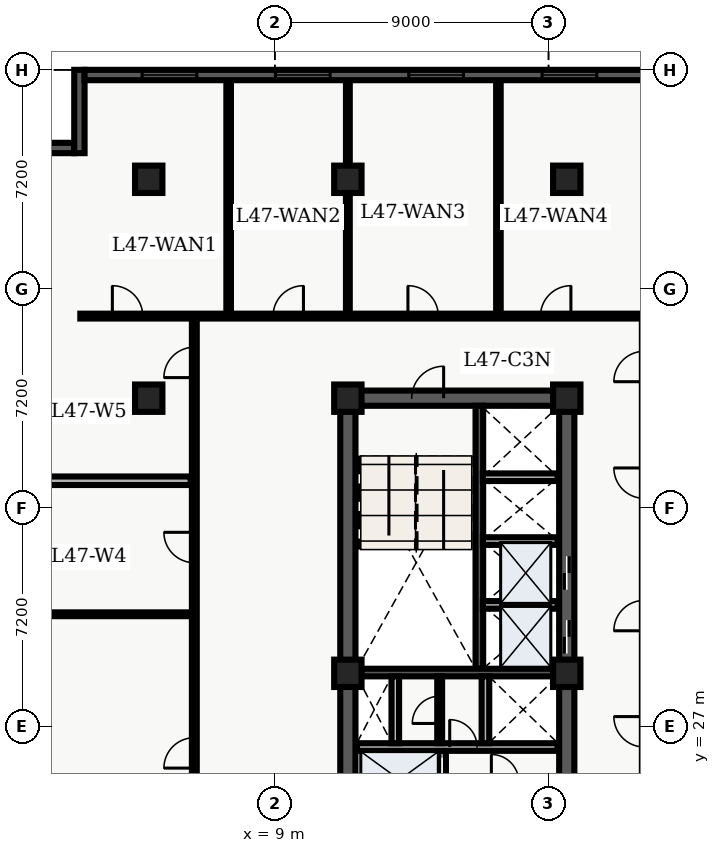
"""IFC4 building model, lengths in metres.
Left out: names, types, materials, properties, quantities, classifications, styles, units other than length and angle.
Written with IfcOpenShell. Run it as: python <this file> out.ifc"""

import sys

from ifc_helpers import new_model, entity, si_unit, converted_unit, direction, frame, origin_with_axes, origin_2d_with_axis, place, context, subcontext, project, spatial, polyline, rectangle, outline, extrude, element, fill, save


model = new_model("IFC4")
c1 = context("Model", 3, precision=1e-05, world=origin_with_axes(), true_north=direction((0.0, 1.0)))
c2 = subcontext(c1, "Body", "Model", "MODEL_VIEW")
j1 = project(units=[si_unit("LENGTHUNIT", "METRE"), converted_unit("PLANEANGLEUNIT", "DEGREE", entity("IfcPlaneAngleMeasure", 0.017), si_unit("PLANEANGLEUNIT", "RADIAN"), dimensions=[0, 0, 0, 0, 0, 0, 0])], contexts=[c1])
p1 = place(None, origin_with_axes())
s1 = spatial("IfcSite", under=j1, at=p1, CompositionType="ELEMENT")
p2 = place(p1, origin_with_axes())
s2 = spatial("IfcBuilding", under=s1, at=p2, CompositionType="ELEMENT")
p3 = place(p2, frame((0.0, 0.0, 192.6), z_axis=(0.0, 0.0, 1.0), x_axis=(1.0, 0.0, 0.0)))
s3 = spatial("IfcBuildingStorey", under=s2, at=p3, CompositionType="ELEMENT", Elevation=192.6)
p4 = place(p3, frame((11.4, 10.8, 0.0), z_axis=(0.0, 0.0, 1.0), x_axis=(0.0, 1.0, 0.0)))
e1 = element("IfcWall", 1, at=p4, inside=s3, PredefinedType="SHEAR", context=c2, shape_type="SweptSolid", body=[
    extrude(outline(polyline([(0.0, -0.25), (27.0, -0.25), (27.0, 0.25), (0.0, 0.25), (0.0, -0.25)])), origin_with_axes(), (0.0, 0.0, 1.0), 3.66),
])
p5 = place(p3, frame((11.4, 37.8, 0.0), z_axis=(0.0, 0.0, 1.0), x_axis=(1.0, 0.0, 0.0)))
e2 = element("IfcWall", 2, at=p5, inside=s3, PredefinedType="SHEAR", context=c2, shape_type="SweptSolid", body=[
    extrude(outline(polyline([(0.0, -0.25), (7.2, -0.25), (7.2, 0.25), (0.0, 0.25), (0.0, -0.25)])), origin_with_axes(), (0.0, 0.0, 1.0), 3.66),
])
p6 = place(p5, frame((2.625, 0.0, 0.0), z_axis=(0.0, 0.0, 1.0), x_axis=(1.0, 0.0, 0.0)))
e3 = element("IfcOpeningElement", 3, at=p6, cuts=e2, PredefinedType="OPENING", context=c2, shape_type="SweptSolid", body=[
    extrude(rectangle(XDim=1.05, YDim=0.52, at=origin_2d_with_axis()), origin_with_axes(), (0.0, 0.0, 1.0), 2.15),
])
p7 = place(p3, frame((18.6, 24.3, 0.0), z_axis=(0.0, 0.0, 1.0), x_axis=(0.0, 1.0, 0.0)))
e4 = element("IfcWall", 4, at=p7, inside=s3, PredefinedType="SHEAR", context=c2, shape_type="SweptSolid", body=[
    extrude(outline(polyline([(0.0, -0.25), (13.5, -0.25), (13.5, 0.25), (0.0, 0.25), (0.0, -0.25)])), origin_with_axes(), (0.0, 0.0, 1.0), 3.66),
])
p8 = place(p7, frame((5.65, 0.0, 0.0), z_axis=(0.0, 0.0, 1.0), x_axis=(1.0, 0.0, 0.0)))
e5 = element("IfcOpeningElement", 5, at=p8, cuts=e4, PredefinedType="OPENING", context=c2, shape_type="SweptSolid", body=[
    extrude(rectangle(XDim=1.1, YDim=0.52, at=origin_2d_with_axis()), origin_with_axes(), (0.0, 0.0, 1.0), 2.15),
])
p9 = place(p7, frame((7.75, 0.0, 0.0), z_axis=(0.0, 0.0, 1.0), x_axis=(1.0, 0.0, 0.0)))
e6 = element("IfcOpeningElement", 6, at=p9, cuts=e4, PredefinedType="OPENING", context=c2, shape_type="SweptSolid", body=[
    extrude(rectangle(XDim=1.1, YDim=0.52, at=origin_2d_with_axis()), origin_with_axes(), (0.0, 0.0, 1.0), 2.15),
])
p10 = place(p3, frame((15.725, 28.9, 0.0), z_axis=(0.0, 0.0, 1.0), x_axis=(0.0, 1.0, 0.0)))
e7 = element("IfcWall", 7, at=p10, inside=s3, PredefinedType="SHEAR", context=c2, shape_type="SweptSolid", body=[
    extrude(outline(polyline([(0.0, -0.125), (8.65, -0.125), (8.65, 0.125), (0.0, 0.125), (0.0, -0.125)])), origin_with_axes(), (0.0, 0.0, 1.0), 3.66),
])
p11 = place(p3, frame((11.65, 28.775, 0.0), z_axis=(0.0, 0.0, 1.0), x_axis=(1.0, 0.0, 0.0)))
e8 = element("IfcWall", 8, at=p11, inside=s3, PredefinedType="SHEAR", context=c2, shape_type="SweptSolid", body=[
    extrude(outline(polyline([(0.0, -0.125), (6.7, -0.125), (6.7, 0.125), (0.0, 0.125), (0.0, -0.125)])), origin_with_axes(), (0.0, 0.0, 1.0), 3.66),
])
p12 = place(p3, frame((14.5, 19.95, 0.0), z_axis=(0.0, 0.0, 1.0), x_axis=(0.0, 1.0, 0.0)))
e9 = element("IfcWall", 9, at=p12, inside=s3, PredefinedType="SOLIDWALL", context=c2, shape_type="SweptSolid", body=[
    extrude(outline(polyline([(0.0, -0.125), (6.25, -0.125), (6.25, 0.125), (0.0, 0.125), (0.0, -0.125)])), origin_with_axes(), (0.0, 0.0, 1.0), 2.7),
])
p13 = place(p12, frame((1.025, 0.0, 0.0), z_axis=(0.0, 0.0, 1.0), x_axis=(1.0, 0.0, 0.0)))
e10 = element("IfcOpeningElement", 10, at=p13, cuts=e9, PredefinedType="OPENING", context=c2, shape_type="SweptSolid", body=[
    extrude(rectangle(XDim=1.1, YDim=0.27, at=origin_2d_with_axis()), origin_with_axes(), (0.0, 0.0, 1.0), 2.15),
])
p14 = place(p12, frame((2.975, 0.0, 0.0), z_axis=(0.0, 0.0, 1.0), x_axis=(1.0, 0.0, 0.0)))
e11 = element("IfcOpeningElement", 11, at=p14, cuts=e9, PredefinedType="OPENING", context=c2, shape_type="SweptSolid", body=[
    extrude(rectangle(XDim=1.1, YDim=0.27, at=origin_2d_with_axis()), origin_with_axes(), (0.0, 0.0, 1.0), 2.15),
])
p15 = place(p12, frame((5.425, 0.0, 0.0), z_axis=(0.0, 0.0, 1.0), x_axis=(1.0, 0.0, 0.0)))
e12 = element("IfcOpeningElement", 12, at=p15, cuts=e9, PredefinedType="OPENING", context=c2, shape_type="SweptSolid", body=[
    extrude(rectangle(XDim=1.2, YDim=0.27, at=origin_2d_with_axis()), origin_with_axes(), (0.0, 0.0, 1.0), 2.15),
])
p16 = place(p3, frame((11.7, 26.325, 0.0), z_axis=(0.0, 0.0, 1.0), x_axis=(1.0, 0.0, 0.0)))
e13 = element("IfcWall", 13, at=p16, inside=s3, PredefinedType="SOLIDWALL", context=c2, shape_type="SweptSolid", body=[
    extrude(outline(polyline([(0.0, -0.125), (6.6, -0.125), (6.6, 0.125), (0.0, 0.125), (0.0, -0.125)])), origin_with_axes(), (0.0, 0.0, 1.0), 2.7),
])
p17 = place(p16, frame((3.5, 0.0, 0.0), z_axis=(0.0, 0.0, 1.0), x_axis=(1.0, 0.0, 0.0)))
e14 = element("IfcOpeningElement", 14, at=p17, cuts=e13, PredefinedType="OPENING", context=c2, shape_type="SweptSolid", body=[
    extrude(rectangle(XDim=0.9, YDim=0.27, at=origin_2d_with_axis()), origin_with_axes(), (0.0, 0.0, 1.0), 2.15),
])
for number, where, z_axis, x_axis in (
    (15, (12.96, 26.45, 0.0), (0.0, 0.0, 1.0), (0.0, 1.0, 0.0)),
    (16, (15.925, 26.45, 0.0), (0.0, 0.0, 1.0), (0.0, 1.0, 0.0)),
):
    element("IfcWall", number, at=place(p3, frame(where, z_axis=z_axis, x_axis=x_axis)), inside=s3, PredefinedType="SOLIDWALL", context=c2, shape_type="SweptSolid", body=[
        extrude(outline(polyline([(0.0, -0.125), (2.2, -0.125), (2.2, 0.125), (0.0, 0.125), (0.0, -0.125)])), origin_with_axes(), (0.0, 0.0, 1.0), 2.7),
    ])
for number, where, z_axis, x_axis in (
    (17, (11.4, 28.75, 0.0), (0.0, 0.0, 1.0), (1.0, 0.0, 0.0)),
    (18, (11.4, 37.8, 0.0), (0.0, 0.0, 1.0), (1.0, 0.0, 0.0)),
    (19, (11.4, 45.0, 0.0), (0.0, 0.0, 1.0), (1.0, 0.0, 0.0)),
    (20, (18.6, 28.75, 0.0), (0.0, 0.0, 1.0), (1.0, 0.0, 0.0)),
    (21, (18.6, 37.8, 0.0), (0.0, 0.0, 1.0), (1.0, 0.0, 0.0)),
    (22, (18.6, 45.0, 0.0), (0.0, 0.0, 1.0), (1.0, 0.0, 0.0)),
    (23, (4.85, 37.8, 0.0), (0.0, 0.0, 1.0), (1.0, 0.0, 0.0)),
    (24, (4.85, 45.0, 0.0), (0.0, 0.0, 1.0), (1.0, 0.0, 0.0)),
):
    element("IfcColumn", number, at=place(p3, frame(where, z_axis=z_axis, x_axis=x_axis)), inside=s3, PredefinedType="COLUMN", context=c2, shape_type="SweptSolid", body=[
        extrude(rectangle(XDim=0.9, YDim=0.9, at=origin_2d_with_axis()), origin_with_axes(), (0.0, 0.0, 1.0), 3.9),
    ])
p18 = place(p3, frame((14.42, 26.45, 0.0), z_axis=(0.0, 0.0, 1.0), x_axis=(0.0, 1.0, 0.0)))
e25 = element("IfcWall", 25, at=p18, inside=s3, PredefinedType="PARTITIONING", context=c2, shape_type="SweptSolid", body=[
    extrude(outline(polyline([(0.0, -0.08), (2.2, -0.08), (2.2, 0.08), (0.0, 0.08), (0.0, -0.08)])), origin_with_axes(), (0.0, 0.0, 1.0), 2.7),
])
p19 = place(p18, frame((1.1, 0.0, 0.0), z_axis=(0.0, 0.0, 1.0), x_axis=(1.0, 0.0, 0.0)))
e26 = element("IfcOpeningElement", 26, at=p19, cuts=e25, PredefinedType="OPENING", context=c2, shape_type="SweptSolid", body=[
    extrude(rectangle(XDim=0.9, YDim=0.18, at=origin_2d_with_axis()), origin_with_axes(), (0.0, 0.0, 1.0), 2.15),
])
for number, where, z_axis, x_axis in (
    (27, (15.84, 31.0, 0.0), (0.0, 0.0, 1.0), (1.0, 0.0, 0.0)),
    (28, (15.84, 33.1, 0.0), (0.0, 0.0, 1.0), (1.0, 0.0, 0.0)),
    (29, (15.84, 35.2, 0.0), (0.0, 0.0, 1.0), (1.0, 0.0, 0.0)),
):
    element("IfcWall", number, at=place(p3, frame(where, z_axis=z_axis, x_axis=x_axis)), inside=s3, PredefinedType="SOLIDWALL", context=c2, shape_type="SweptSolid", body=[
        extrude(outline(polyline([(0.0, -0.125), (2.46, -0.125), (2.46, 0.125), (0.0, 0.125), (0.0, -0.125)])), origin_with_axes(), (0.0, 0.0, 1.0), 2.7),
    ])
p20 = place(p3, frame((2.6, 40.5, 0.0), z_axis=(0.0, 0.0, 1.0), x_axis=(1.0, 0.0, 0.0)))
e30 = element("IfcWall", 30, at=p20, inside=s3, PredefinedType="PARTITIONING", context=c2, shape_type="SweptSolid", body=[
    extrude(outline(polyline([(0.0, -0.08), (24.746, -0.08), (24.746, 0.08), (0.0, 0.08), (0.0, -0.08)])), origin_with_axes(), (0.0, 0.0, 1.0), 2.7),
])
p21 = place(p20, frame((1.554, 0.0, 0.0), z_axis=(0.0, 0.0, 1.0), x_axis=(1.0, 0.0, 0.0)))
e31 = element("IfcOpeningElement", 31, at=p21, cuts=e30, PredefinedType="OPENING", context=c2, shape_type="SweptSolid", body=[
    extrude(rectangle(XDim=1.0, YDim=0.18, at=origin_2d_with_axis()), origin_with_axes(), (0.0, 0.0, 1.0), 2.15),
])
p22 = place(p20, frame((6.84, 0.0, 0.0), z_axis=(0.0, 0.0, 1.0), x_axis=(1.0, 0.0, 0.0)))
e32 = element("IfcOpeningElement", 32, at=p22, cuts=e30, PredefinedType="OPENING", context=c2, shape_type="SweptSolid", body=[
    extrude(rectangle(XDim=1.0, YDim=0.18, at=origin_2d_with_axis()), origin_with_axes(), (0.0, 0.0, 1.0), 2.15),
])
p23 = place(p20, frame((11.276, 0.0, 0.0), z_axis=(0.0, 0.0, 1.0), x_axis=(1.0, 0.0, 0.0)))
e33 = element("IfcOpeningElement", 33, at=p23, cuts=e30, PredefinedType="OPENING", context=c2, shape_type="SweptSolid", body=[
    extrude(rectangle(XDim=1.0, YDim=0.18, at=origin_2d_with_axis()), origin_with_axes(), (0.0, 0.0, 1.0), 2.15),
])
p24 = place(p20, frame((15.636, 0.0, 0.0), z_axis=(0.0, 0.0, 1.0), x_axis=(1.0, 0.0, 0.0)))
e34 = element("IfcOpeningElement", 34, at=p24, cuts=e30, PredefinedType="OPENING", context=c2, shape_type="SweptSolid", body=[
    extrude(rectangle(XDim=1.0, YDim=0.18, at=origin_2d_with_axis()), origin_with_axes(), (0.0, 0.0, 1.0), 2.15),
])
p25 = place(p3, frame((6.35, 7.8, 0.0), z_axis=(0.0, 0.0, 1.0), x_axis=(0.0, 1.0, 0.0)))
e35 = element("IfcWall", 35, at=p25, inside=s3, PredefinedType="PARTITIONING", context=c2, shape_type="SweptSolid", body=[
    extrude(outline(polyline([(0.0, -0.08), (32.7, -0.08), (32.7, 0.08), (0.0, 0.08), (0.0, -0.08)])), origin_with_axes(), (0.0, 0.0, 1.0), 2.7),
])
p26 = place(p25, frame((4.415, 0.0, 0.0), z_axis=(0.0, 0.0, 1.0), x_axis=(1.0, 0.0, 0.0)))
e36 = element("IfcOpeningElement", 36, at=p26, cuts=e35, PredefinedType="OPENING", context=c2, shape_type="SweptSolid", body=[
    extrude(rectangle(XDim=1.0, YDim=0.18, at=origin_2d_with_axis()), origin_with_axes(), (0.0, 0.0, 1.0), 2.15),
])
p27 = place(p25, frame((9.986, 0.0, 0.0), z_axis=(0.0, 0.0, 1.0), x_axis=(1.0, 0.0, 0.0)))
e37 = element("IfcOpeningElement", 37, at=p27, cuts=e35, PredefinedType="OPENING", context=c2, shape_type="SweptSolid", body=[
    extrude(rectangle(XDim=1.0, YDim=0.18, at=origin_2d_with_axis()), origin_with_axes(), (0.0, 0.0, 1.0), 2.15),
])
p28 = place(p25, frame((18.332, 0.0, 0.0), z_axis=(0.0, 0.0, 1.0), x_axis=(1.0, 0.0, 0.0)))
e38 = element("IfcOpeningElement", 38, at=p28, cuts=e35, PredefinedType="OPENING", context=c2, shape_type="SweptSolid", body=[
    extrude(rectangle(XDim=1.0, YDim=0.18, at=origin_2d_with_axis()), origin_with_axes(), (0.0, 0.0, 1.0), 2.15),
])
p29 = place(p25, frame((25.088, 0.0, 0.0), z_axis=(0.0, 0.0, 1.0), x_axis=(1.0, 0.0, 0.0)))
e39 = element("IfcOpeningElement", 39, at=p29, cuts=e35, PredefinedType="OPENING", context=c2, shape_type="SweptSolid", body=[
    extrude(rectangle(XDim=1.0, YDim=0.18, at=origin_2d_with_axis()), origin_with_axes(), (0.0, 0.0, 1.0), 2.15),
])
p30 = place(p25, frame((31.177, 0.0, 0.0), z_axis=(0.0, 0.0, 1.0), x_axis=(1.0, 0.0, 0.0)))
e40 = element("IfcOpeningElement", 40, at=p30, cuts=e35, PredefinedType="OPENING", context=c2, shape_type="SweptSolid", body=[
    extrude(rectangle(XDim=1.0, YDim=0.18, at=origin_2d_with_axis()), origin_with_axes(), (0.0, 0.0, 1.0), 2.15),
])
p31 = place(p3, frame((0.335, 30.692, 0.0), z_axis=(0.0, 0.0, 1.0), x_axis=(1.0, 0.0, 0.0)))
e41 = element("IfcWall", 41, at=p31, inside=s3, PredefinedType="PARTITIONING", context=c2, shape_type="SweptSolid", body=[
    extrude(outline(polyline([(0.0, -0.062), (5.895, -0.062), (5.895, 0.062), (0.0, 0.062), (0.0, -0.062)])), origin_with_axes(), (0.0, 0.0, 1.0), 2.7),
])
p32 = place(p3, frame((0.335, 35.084, 0.0), z_axis=(0.0, 0.0, 1.0), x_axis=(1.0, 0.0, 0.0)))
e42 = element("IfcWall", 42, at=p32, inside=s3, PredefinedType="PARTITIONING", context=c2, shape_type="SweptSolid", body=[
    extrude(outline(polyline([(0.0, -0.14), (5.895, -0.14), (5.895, 0.14), (0.0, 0.14), (0.0, -0.14)])), origin_with_axes(), (0.0, 0.0, 1.0), 2.7),
])
p33 = place(p3, frame((7.479, 40.6, 0.0), z_axis=(0.0, 0.0, 1.0), x_axis=(0.0, 1.0, 0.0)))
e43 = element("IfcWall", 43, at=p33, inside=s3, PredefinedType="PARTITIONING", context=c2, shape_type="SweptSolid", body=[
    extrude(outline(polyline([(0.0, -0.075), (7.665, -0.075), (7.665, 0.075), (0.0, 0.075), (0.0, -0.075)])), origin_with_axes(), (0.0, 0.0, 1.0), 2.7),
])
p34 = place(p3, frame((11.4, 40.6, 0.0), z_axis=(0.0, 0.0, 1.0), x_axis=(0.0, 1.0, 0.0)))
e44 = element("IfcWall", 44, at=p34, inside=s3, PredefinedType="PARTITIONING", context=c2, shape_type="SweptSolid", body=[
    extrude(outline(polyline([(0.0, -0.062), (7.665, -0.062), (7.665, 0.062), (0.0, 0.062), (0.0, -0.062)])), origin_with_axes(), (0.0, 0.0, 1.0), 2.7),
])
p35 = place(p3, frame((16.352, 40.6, 0.0), z_axis=(0.0, 0.0, 1.0), x_axis=(0.0, 1.0, 0.0)))
e45 = element("IfcWall", 45, at=p35, inside=s3, PredefinedType="PARTITIONING", context=c2, shape_type="SweptSolid", body=[
    extrude(outline(polyline([(0.0, -0.075), (7.665, -0.075), (7.665, 0.075), (0.0, 0.075), (0.0, -0.075)])), origin_with_axes(), (0.0, 0.0, 1.0), 2.7),
])
p36 = place(p3, frame((0.34, 46.03, 0.0), z_axis=(0.0, 0.0, 1.0), x_axis=(1.0, 0.0, 0.0)))
e46 = element("IfcWall", 46, at=p36, inside=s3, PredefinedType="SOLIDWALL", context=c2, shape_type="SweptSolid", body=[
    extrude(outline(polyline([(0.0, -0.17), (2.06, -0.17), (2.06, 0.17), (0.0, 0.17), (0.0, -0.17)])), origin_with_axes(), (0.0, 0.0, 1.0), 3.66),
])
p37 = place(p3, frame((2.57, 45.86, 0.0), z_axis=(0.0, 0.0, 1.0), x_axis=(0.0, 1.0, 0.0)))
e47 = element("IfcWall", 47, at=p37, inside=s3, PredefinedType="SOLIDWALL", context=c2, shape_type="SweptSolid", body=[
    extrude(outline(polyline([(0.0, -0.17), (2.74, -0.17), (2.74, 0.17), (0.0, 0.17), (0.0, -0.17)])), origin_with_axes(), (0.0, 0.0, 1.0), 3.66),
])
p38 = place(p3, frame((2.74, 48.43, 0.0), z_axis=(0.0, 0.0, 1.0), x_axis=(1.0, 0.0, 0.0)))
e48 = element("IfcWall", 48, at=p38, inside=s3, PredefinedType="SOLIDWALL", context=c2, shape_type="SweptSolid", body=[
    extrude(outline(polyline([(0.0, -0.17), (18.741, -0.17), (18.741, 0.17), (0.0, 0.17), (0.0, -0.17)])), origin_with_axes(), (0.0, 0.0, 1.0), 3.66),
])
p39 = place(p38, frame((2.793, 0.0, 0.45), z_axis=(0.0, 0.0, 1.0), x_axis=(1.0, 0.0, 0.0)))
e49 = element("IfcOpeningElement", 49, at=p39, cuts=e48, PredefinedType="OPENING", context=c2, shape_type="SweptSolid", body=[
    extrude(rectangle(XDim=1.8, YDim=0.36, at=origin_2d_with_axis()), origin_with_axes(), (0.0, 0.0, 1.0), 2.1),
])
p40 = place(p38, frame((7.178, 0.0, 0.45), z_axis=(0.0, 0.0, 1.0), x_axis=(1.0, 0.0, 0.0)))
e50 = element("IfcOpeningElement", 50, at=p40, cuts=e48, PredefinedType="OPENING", context=c2, shape_type="SweptSolid", body=[
    extrude(rectangle(XDim=1.8, YDim=0.36, at=origin_2d_with_axis()), origin_with_axes(), (0.0, 0.0, 1.0), 2.1),
])
p41 = place(p38, frame((11.563, 0.0, 0.45), z_axis=(0.0, 0.0, 1.0), x_axis=(1.0, 0.0, 0.0)))
e51 = element("IfcOpeningElement", 51, at=p41, cuts=e48, PredefinedType="OPENING", context=c2, shape_type="SweptSolid", body=[
    extrude(rectangle(XDim=1.8, YDim=0.36, at=origin_2d_with_axis()), origin_with_axes(), (0.0, 0.0, 1.0), 2.1),
])
p42 = place(p38, frame((15.948, 0.0, 0.45), z_axis=(0.0, 0.0, 1.0), x_axis=(1.0, 0.0, 0.0)))
e52 = element("IfcOpeningElement", 52, at=p42, cuts=e48, PredefinedType="OPENING", context=c2, shape_type="SweptSolid", body=[
    extrude(rectangle(XDim=1.8, YDim=0.36, at=origin_2d_with_axis()), origin_with_axes(), (0.0, 0.0, 1.0), 2.1),
])
p43 = place(p7, frame((5.65, 0.0, 0.0), z_axis=(0.0, 0.0, 1.0), x_axis=(1.0, 0.0, 0.0)))
e53 = element("IfcDoor", 53, at=p43, inside=s3, OperationType="SLIDING_TO_LEFT", PredefinedType="DOOR", context=c2, shape_type="SweptSolid", body=[
    extrude(rectangle(XDim=1.1, YDim=0.09, at=origin_2d_with_axis()), origin_with_axes(), (0.0, 0.0, 1.0), 2.15),
])
fill(e5, e53)
p44 = place(p7, frame((7.75, 0.0, 0.0), z_axis=(0.0, 0.0, 1.0), x_axis=(1.0, 0.0, 0.0)))
e54 = element("IfcDoor", 54, at=p44, inside=s3, OperationType="SLIDING_TO_RIGHT", PredefinedType="DOOR", context=c2, shape_type="SweptSolid", body=[
    extrude(rectangle(XDim=1.1, YDim=0.09, at=origin_2d_with_axis()), origin_with_axes(), (0.0, 0.0, 1.0), 2.15),
])
fill(e6, e54)
p45 = place(p12, frame((5.425, 0.0, 0.0), z_axis=(0.0, 0.0, 1.0), x_axis=(1.0, 0.0, 0.0)))
e55 = element("IfcDoor", 55, at=p45, inside=s3, OperationType="DOUBLE_DOOR_SLIDING", PredefinedType="DOOR", context=c2, shape_type="SweptSolid", body=[
    extrude(rectangle(XDim=1.2, YDim=0.09, at=origin_2d_with_axis()), origin_with_axes(), (0.0, 0.0, 1.0), 2.15),
])
fill(e12, e55)
p46 = place(p5, frame((2.625, 0.0, 0.0), z_axis=(0.0, 0.0, 1.0), x_axis=(1.0, 0.0, 0.0)))
e56 = element("IfcDoor", 56, at=p46, inside=s3, OperationType="SINGLE_SWING_RIGHT", PredefinedType="DOOR", context=c2, shape_type="SweptSolid", body=[
    extrude(rectangle(XDim=1.05, YDim=0.09, at=origin_2d_with_axis()), origin_with_axes(), (0.0, 0.0, 1.0), 2.15),
])
fill(e3, e56)
p47 = place(p16, frame((3.5, 0.0, 0.0), z_axis=(0.0, 0.0, 1.0), x_axis=(1.0, 0.0, 0.0)))
e57 = element("IfcDoor", 57, at=p47, inside=s3, OperationType="SINGLE_SWING_LEFT", PredefinedType="DOOR", context=c2, shape_type="SweptSolid", body=[
    extrude(rectangle(XDim=0.9, YDim=0.09, at=origin_2d_with_axis()), origin_with_axes(), (0.0, 0.0, 1.0), 2.15),
])
fill(e14, e57)
p48 = place(p18, frame((1.1, 0.0, 0.0), z_axis=(0.0, 0.0, 1.0), x_axis=(1.0, 0.0, 0.0)))
e58 = element("IfcDoor", 58, at=p48, inside=s3, OperationType="SINGLE_SWING_LEFT", PredefinedType="DOOR", context=c2, shape_type="SweptSolid", body=[
    extrude(rectangle(XDim=0.9, YDim=0.09, at=origin_2d_with_axis()), origin_with_axes(), (0.0, 0.0, 1.0), 2.15),
])
fill(e26, e58)
p49 = place(p25, frame((18.332, 0.0, 0.0), z_axis=(0.0, 0.0, 1.0), x_axis=(1.0, 0.0, 0.0)))
e59 = element("IfcDoor", 59, at=p49, inside=s3, OperationType="SINGLE_SWING_LEFT", PredefinedType="DOOR", context=c2, shape_type="SweptSolid", body=[
    extrude(rectangle(XDim=1.0, YDim=0.09, at=origin_2d_with_axis()), origin_with_axes(), (0.0, 0.0, 1.0), 2.15),
])
fill(e38, e59)
p50 = place(p25, frame((25.088, 0.0, 0.0), z_axis=(0.0, 0.0, 1.0), x_axis=(1.0, 0.0, 0.0)))
e60 = element("IfcDoor", 60, at=p50, inside=s3, OperationType="SINGLE_SWING_RIGHT", PredefinedType="DOOR", context=c2, shape_type="SweptSolid", body=[
    extrude(rectangle(XDim=1.0, YDim=0.09, at=origin_2d_with_axis()), origin_with_axes(), (0.0, 0.0, 1.0), 2.15),
])
fill(e39, e60)
p51 = place(p25, frame((31.177, 0.0, 0.0), z_axis=(0.0, 0.0, 1.0), x_axis=(1.0, 0.0, 0.0)))
e61 = element("IfcDoor", 61, at=p51, inside=s3, OperationType="SINGLE_SWING_LEFT", PredefinedType="DOOR", context=c2, shape_type="SweptSolid", body=[
    extrude(rectangle(XDim=1.0, YDim=0.09, at=origin_2d_with_axis()), origin_with_axes(), (0.0, 0.0, 1.0), 2.15),
])
fill(e40, e61)
p52 = place(p20, frame((1.554, 0.0, 0.0), z_axis=(0.0, 0.0, 1.0), x_axis=(1.0, 0.0, 0.0)))
e62 = element("IfcDoor", 62, at=p52, inside=s3, OperationType="SINGLE_SWING_LEFT", PredefinedType="DOOR", context=c2, shape_type="SweptSolid", body=[
    extrude(rectangle(XDim=1.0, YDim=0.09, at=origin_2d_with_axis()), origin_with_axes(), (0.0, 0.0, 1.0), 2.15),
])
fill(e31, e62)
p53 = place(p20, frame((6.84, 0.0, 0.0), z_axis=(0.0, 0.0, 1.0), x_axis=(1.0, 0.0, 0.0)))
e63 = element("IfcDoor", 63, at=p53, inside=s3, OperationType="SINGLE_SWING_RIGHT", PredefinedType="DOOR", context=c2, shape_type="SweptSolid", body=[
    extrude(rectangle(XDim=1.0, YDim=0.09, at=origin_2d_with_axis()), origin_with_axes(), (0.0, 0.0, 1.0), 2.15),
])
fill(e32, e63)
p54 = place(p20, frame((11.276, 0.0, 0.0), z_axis=(0.0, 0.0, 1.0), x_axis=(1.0, 0.0, 0.0)))
e64 = element("IfcDoor", 64, at=p54, inside=s3, OperationType="SINGLE_SWING_LEFT", PredefinedType="DOOR", context=c2, shape_type="SweptSolid", body=[
    extrude(rectangle(XDim=1.0, YDim=0.09, at=origin_2d_with_axis()), origin_with_axes(), (0.0, 0.0, 1.0), 2.15),
])
fill(e33, e64)
p55 = place(p20, frame((15.636, 0.0, 0.0), z_axis=(0.0, 0.0, 1.0), x_axis=(1.0, 0.0, 0.0)))
e65 = element("IfcDoor", 65, at=p55, inside=s3, OperationType="SINGLE_SWING_RIGHT", PredefinedType="DOOR", context=c2, shape_type="SweptSolid", body=[
    extrude(rectangle(XDim=1.0, YDim=0.09, at=origin_2d_with_axis()), origin_with_axes(), (0.0, 0.0, 1.0), 2.15),
])
fill(e34, e65)
p56 = place(p38, frame((2.793, 0.0, 0.45), z_axis=(0.0, 0.0, 1.0), x_axis=(1.0, 0.0, 0.0)))
e66 = element("IfcWindow", 66, at=p56, inside=s3, PredefinedType="WINDOW", context=c2, shape_type="SweptSolid", body=[
    extrude(rectangle(XDim=1.8, YDim=0.09, at=origin_2d_with_axis()), origin_with_axes(), (0.0, 0.0, 1.0), 2.1),
])
fill(e49, e66)
p57 = place(p38, frame((7.178, 0.0, 0.45), z_axis=(0.0, 0.0, 1.0), x_axis=(1.0, 0.0, 0.0)))
e67 = element("IfcWindow", 67, at=p57, inside=s3, PredefinedType="WINDOW", context=c2, shape_type="SweptSolid", body=[
    extrude(rectangle(XDim=1.8, YDim=0.09, at=origin_2d_with_axis()), origin_with_axes(), (0.0, 0.0, 1.0), 2.1),
])
fill(e50, e67)
p58 = place(p38, frame((11.563, 0.0, 0.45), z_axis=(0.0, 0.0, 1.0), x_axis=(1.0, 0.0, 0.0)))
e68 = element("IfcWindow", 68, at=p58, inside=s3, PredefinedType="WINDOW", context=c2, shape_type="SweptSolid", body=[
    extrude(rectangle(XDim=1.8, YDim=0.09, at=origin_2d_with_axis()), origin_with_axes(), (0.0, 0.0, 1.0), 2.1),
])
fill(e51, e68)
p59 = place(p38, frame((15.948, 0.0, 0.45), z_axis=(0.0, 0.0, 1.0), x_axis=(1.0, 0.0, 0.0)))
e69 = element("IfcWindow", 69, at=p59, inside=s3, PredefinedType="WINDOW", context=c2, shape_type="SweptSolid", body=[
    extrude(rectangle(XDim=1.8, YDim=0.09, at=origin_2d_with_axis()), origin_with_axes(), (0.0, 0.0, 1.0), 2.1),
])
fill(e52, e69)
save(model, sys.argv[1])
